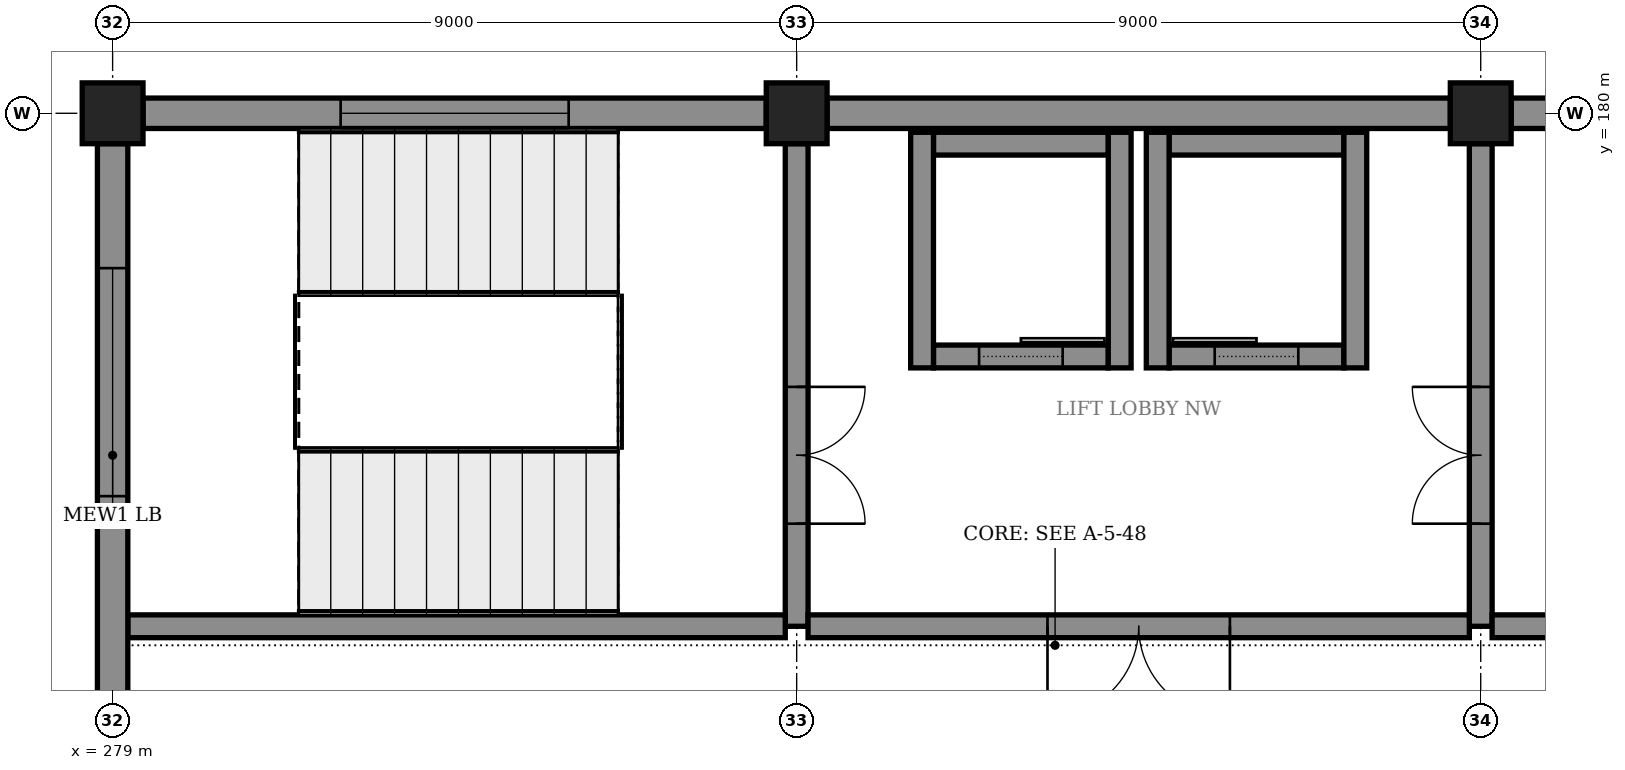
"""IFC4 building model, lengths in metres.
Left out: names, types, materials, properties, quantities, classifications, styles, units other than length and angle.
Written with IfcOpenShell. Run it as: python <this file> out.ifc"""

import sys

from ifc_helpers import new_model, si_unit, direction, frame, frame_2d, origin, origin_2d, place, context, subcontext, project, spatial, rectangle, extrude, element, fill, save


model = new_model("IFC4")
c1 = context("Model", 3, precision=1e-05, world=origin(), true_north=direction((0.0, 1.0)))
c2 = subcontext(c1, "Body", "Model", "MODEL_VIEW")
j1 = project(units=[si_unit("LENGTHUNIT", "METRE"), si_unit("PLANEANGLEUNIT", "RADIAN")], contexts=[c1])
p1 = place(None, origin())
s1 = spatial("IfcSite", under=j1, at=p1, CompositionType="ELEMENT")
p2 = place(p1, origin())
s2 = spatial("IfcBuilding", under=s1, at=p2, CompositionType="ELEMENT")
p3 = place(p2, frame((0.0, 0.0, 11.5)))
s3 = spatial("IfcBuildingStorey", under=s2, at=p3, CompositionType="ELEMENT", Elevation=11.5)
for number, where, z_axis, x_axis in (
    (1, (279.0, 180.0, 0.0), (0.0, 0.0, 1.0), (1.0, 0.0, 0.0)),
    (2, (288.0, 180.0, 0.0), (0.0, 0.0, 1.0), (1.0, 0.0, 0.0)),
    (3, (297.0, 180.0, 0.0), (0.0, 0.0, 1.0), (1.0, 0.0, 0.0)),
):
    element("IfcColumn", number, at=place(p3, frame(where, z_axis=z_axis, x_axis=x_axis)), inside=s3, PredefinedType="COLUMN", context=c2, shape_type="SweptSolid", body=[
        extrude(rectangle(XDim=0.8, YDim=0.8, at=origin_2d()), origin(), (0.0, 0.0, 1.0), 5.5),
    ])
p4 = place(p3, frame((279.4, 180.0, 0.0), z_axis=(0.0, 0.0, 1.0), x_axis=(1.0, 0.0, 0.0)))
e4 = element("IfcWall", 4, at=p4, inside=s3, PredefinedType="STANDARD", context=c2, shape_type="SweptSolid", body=[
    extrude(rectangle(XDim=8.2, YDim=0.4, at=frame_2d((4.1, 0.0))), origin(), (0.0, 0.0, 1.0), 4.32),
])
p5 = place(p4, frame((2.6, 0.0, 0.9)))
e5 = element("IfcOpeningElement", 5, at=p5, cuts=e4, PredefinedType="OPENING", context=c2, shape_type="SweptSolid", body=[
    extrude(rectangle(XDim=3.0, YDim=2.1, at=frame_2d((1.5, 1.05))), frame((0.0, 0.21, 0.0), z_axis=(0.0, -1.0, 0.0), x_axis=(1.0, 0.0, 0.0)), (0.0, 0.0, 1.0), 0.42),
])
p6 = place(p3, frame((288.4, 180.0, 0.0), z_axis=(0.0, 0.0, 1.0), x_axis=(1.0, 0.0, 0.0)))
e6 = element("IfcWall", 6, at=p6, inside=s3, PredefinedType="STANDARD", context=c2, shape_type="SweptSolid", body=[
    extrude(rectangle(XDim=8.2, YDim=0.4, at=frame_2d((4.1, 0.0))), origin(), (0.0, 0.0, 1.0), 4.32),
])
p7 = place(p3, frame((297.4, 180.0, 0.0), z_axis=(0.0, 0.0, 1.0), x_axis=(1.0, 0.0, 0.0)))
e7 = element("IfcWall", 7, at=p7, inside=s3, PredefinedType="STANDARD", context=c2, shape_type="SweptSolid", body=[
    extrude(rectangle(XDim=8.2, YDim=0.4, at=frame_2d((4.1, 0.0))), origin(), (0.0, 0.0, 1.0), 4.32),
])
p8 = place(p7, frame((2.6, 0.0, 0.9)))
e8 = element("IfcOpeningElement", 8, at=p8, cuts=e7, PredefinedType="OPENING", context=c2, shape_type="SweptSolid", body=[
    extrude(rectangle(XDim=3.0, YDim=2.1, at=frame_2d((1.5, 1.05))), frame((0.0, 0.21, 0.0), z_axis=(0.0, -1.0, 0.0), x_axis=(1.0, 0.0, 0.0)), (0.0, 0.0, 1.0), 0.42),
])
p9 = place(p3, frame((279.0, 171.4, 0.0), z_axis=(0.0, 0.0, 1.0), x_axis=(0.0, 1.0, 0.0)))
e9 = element("IfcWall", 9, at=p9, inside=s3, PredefinedType="STANDARD", context=c2, shape_type="SweptSolid", body=[
    extrude(rectangle(XDim=8.2, YDim=0.4, at=frame_2d((4.1, 0.0))), origin(), (0.0, 0.0, 1.0), 4.32),
])
p10 = place(p9, frame((3.562, 0.0, 0.9)))
e10 = element("IfcOpeningElement", 10, at=p10, cuts=e9, PredefinedType="OPENING", context=c2, shape_type="SweptSolid", body=[
    extrude(rectangle(XDim=3.0, YDim=2.1, at=frame_2d((1.5, 1.05))), frame((0.0, 0.21, 0.0), z_axis=(0.0, -1.0, 0.0), x_axis=(1.0, 0.0, 0.0)), (0.0, 0.0, 1.0), 0.42),
])
p11 = place(p3, frame((288.0, 173.25, 0.0), z_axis=(0.0, 0.0, 1.0), x_axis=(0.0, 1.0, 0.0)))
e11 = element("IfcWall", 11, at=p11, inside=s3, PredefinedType="SHEAR", context=c2, shape_type="SweptSolid", body=[
    extrude(rectangle(XDim=6.35, YDim=0.3, at=frame_2d((3.175, 0.0))), origin(), (0.0, 0.0, 1.0), 5.22),
])
p12 = place(p11, frame((1.35, 0.0, 0.0)))
e12 = element("IfcOpeningElement", 12, at=p12, cuts=e11, PredefinedType="OPENING", context=c2, shape_type="SweptSolid", body=[
    extrude(rectangle(XDim=1.8, YDim=2.4, at=frame_2d((0.9, 1.2))), frame((0.0, 0.16, 0.0), z_axis=(0.0, -1.0, 0.0), x_axis=(1.0, 0.0, 0.0)), (0.0, 0.0, 1.0), 0.32),
])
p13 = place(p3, frame((297.0, 173.25, 0.0), z_axis=(0.0, 0.0, 1.0), x_axis=(0.0, 1.0, 0.0)))
e13 = element("IfcWall", 13, at=p13, inside=s3, PredefinedType="SHEAR", context=c2, shape_type="SweptSolid", body=[
    extrude(rectangle(XDim=6.35, YDim=0.3, at=frame_2d((3.175, 0.0))), origin(), (0.0, 0.0, 1.0), 5.22),
])
p14 = place(p13, frame((1.35, 0.0, 0.0)))
e14 = element("IfcOpeningElement", 14, at=p14, cuts=e13, PredefinedType="OPENING", context=c2, shape_type="SweptSolid", body=[
    extrude(rectangle(XDim=1.8, YDim=2.4, at=frame_2d((0.9, 1.2))), frame((0.0, 0.16, 0.0), z_axis=(0.0, -1.0, 0.0), x_axis=(1.0, 0.0, 0.0)), (0.0, 0.0, 1.0), 0.32),
])
p15 = place(p3, frame((279.2, 173.25, 0.0), z_axis=(0.0, 0.0, 1.0), x_axis=(1.0, 0.0, 0.0)))
e15 = element("IfcWall", 15, at=p15, inside=s3, PredefinedType="SHEAR", context=c2, shape_type="SweptSolid", body=[
    extrude(rectangle(XDim=8.65, YDim=0.3, at=frame_2d((4.325, 0.0))), origin(), (0.0, 0.0, 1.0), 5.22),
])
p16 = place(p3, frame((288.15, 173.25, 0.0), z_axis=(0.0, 0.0, 1.0), x_axis=(1.0, 0.0, 0.0)))
e16 = element("IfcWall", 16, at=p16, inside=s3, PredefinedType="SHEAR", context=c2, shape_type="SweptSolid", body=[
    extrude(rectangle(XDim=8.7, YDim=0.3, at=frame_2d((4.35, 0.0))), origin(), (0.0, 0.0, 1.0), 5.22),
])
p17 = place(p16, frame((3.15, 0.0, 0.0)))
e17 = element("IfcOpeningElement", 17, at=p17, cuts=e16, PredefinedType="OPENING", context=c2, shape_type="SweptSolid", body=[
    extrude(rectangle(XDim=2.4, YDim=2.4, at=frame_2d((1.2, 1.2))), frame((0.0, 0.16, 0.0), z_axis=(0.0, -1.0, 0.0), x_axis=(1.0, 0.0, 0.0)), (0.0, 0.0, 1.0), 0.32),
])
p18 = place(p3, frame((297.15, 173.25, 0.0), z_axis=(0.0, 0.0, 1.0), x_axis=(1.0, 0.0, 0.0)))
e18 = element("IfcWall", 18, at=p18, inside=s3, PredefinedType="SHEAR", context=c2, shape_type="SweptSolid", body=[
    extrude(rectangle(XDim=8.7, YDim=0.3, at=frame_2d((4.35, 0.0))), origin(), (0.0, 0.0, 1.0), 5.22),
])
for number, where, z_axis, x_axis in (
    (19, (289.65, 176.65, 0.0), (0.0, 0.0, 1.0), (0.0, 1.0, 0.0)),
    (20, (292.25, 176.65, 0.0), (0.0, 0.0, 1.0), (0.0, 1.0, 0.0)),
):
    element("IfcWall", number, at=place(p3, frame(where, z_axis=z_axis, x_axis=x_axis)), inside=s3, PredefinedType="SHEAR", context=c2, shape_type="SweptSolid", body=[
        extrude(rectangle(XDim=3.1, YDim=0.3, at=frame_2d((1.55, 0.0))), origin(), (0.0, 0.0, 1.0), 5.5),
    ])
p19 = place(p3, frame((289.8, 179.6, 0.0), z_axis=(0.0, 0.0, 1.0), x_axis=(1.0, 0.0, 0.0)))
e21 = element("IfcWall", 21, at=p19, inside=s3, PredefinedType="SHEAR", context=c2, shape_type="SweptSolid", body=[
    extrude(rectangle(XDim=2.3, YDim=0.3, at=frame_2d((1.15, 0.0))), origin(), (0.0, 0.0, 1.0), 5.5),
])
p20 = place(p3, frame((289.8, 176.8, 0.0), z_axis=(0.0, 0.0, 1.0), x_axis=(1.0, 0.0, 0.0)))
e22 = element("IfcWall", 22, at=p20, inside=s3, PredefinedType="SHEAR", context=c2, shape_type="SweptSolid", body=[
    extrude(rectangle(XDim=2.3, YDim=0.3, at=frame_2d((1.15, 0.0))), origin(), (0.0, 0.0, 1.0), 5.5),
])
p21 = place(p20, frame((0.6, 0.0, 0.0)))
e23 = element("IfcOpeningElement", 23, at=p21, cuts=e22, PredefinedType="OPENING", context=c2, shape_type="SweptSolid", body=[
    extrude(rectangle(XDim=1.1, YDim=2.2, at=frame_2d((0.55, 1.1))), frame((0.0, 0.16, 0.0), z_axis=(0.0, -1.0, 0.0), x_axis=(1.0, 0.0, 0.0)), (0.0, 0.0, 1.0), 0.32),
])
for number, where, z_axis, x_axis in (
    (24, (292.75, 176.65, 0.0), (0.0, 0.0, 1.0), (0.0, 1.0, 0.0)),
    (25, (295.35, 176.65, 0.0), (0.0, 0.0, 1.0), (0.0, 1.0, 0.0)),
):
    element("IfcWall", number, at=place(p3, frame(where, z_axis=z_axis, x_axis=x_axis)), inside=s3, PredefinedType="SHEAR", context=c2, shape_type="SweptSolid", body=[
        extrude(rectangle(XDim=3.1, YDim=0.3, at=frame_2d((1.55, 0.0))), origin(), (0.0, 0.0, 1.0), 5.5),
    ])
p22 = place(p3, frame((292.9, 179.6, 0.0), z_axis=(0.0, 0.0, 1.0), x_axis=(1.0, 0.0, 0.0)))
e26 = element("IfcWall", 26, at=p22, inside=s3, PredefinedType="SHEAR", context=c2, shape_type="SweptSolid", body=[
    extrude(rectangle(XDim=2.3, YDim=0.3, at=frame_2d((1.15, 0.0))), origin(), (0.0, 0.0, 1.0), 5.5),
])
p23 = place(p3, frame((292.9, 176.8, 0.0), z_axis=(0.0, 0.0, 1.0), x_axis=(1.0, 0.0, 0.0)))
e27 = element("IfcWall", 27, at=p23, inside=s3, PredefinedType="SHEAR", context=c2, shape_type="SweptSolid", body=[
    extrude(rectangle(XDim=2.3, YDim=0.3, at=frame_2d((1.15, 0.0))), origin(), (0.0, 0.0, 1.0), 5.5),
])
p24 = place(p23, frame((0.6, 0.0, 0.0)))
e28 = element("IfcOpeningElement", 28, at=p24, cuts=e27, PredefinedType="OPENING", context=c2, shape_type="SweptSolid", body=[
    extrude(rectangle(XDim=1.1, YDim=2.2, at=frame_2d((0.55, 1.1))), frame((0.0, 0.16, 0.0), z_axis=(0.0, -1.0, 0.0), x_axis=(1.0, 0.0, 0.0)), (0.0, 0.0, 1.0), 0.32),
])
p25 = place(p5, origin())
e29 = element("IfcWindow", 29, at=p25, inside=s3, PartitioningType="TRIPLE_PANEL_VERTICAL", PredefinedType="WINDOW", context=c2, shape_type="SweptSolid", body=[
    extrude(rectangle(XDim=3.0, YDim=2.1, at=frame_2d((1.5, 1.05))), frame((0.0, 0.03, 0.0), z_axis=(0.0, -1.0, 0.0), x_axis=(1.0, 0.0, 0.0)), (0.0, 0.0, 1.0), 0.06),
])
fill(e5, e29)
p26 = place(p10, origin())
e30 = element("IfcWindow", 30, at=p26, inside=s3, PartitioningType="TRIPLE_PANEL_VERTICAL", PredefinedType="WINDOW", context=c2, shape_type="SweptSolid", body=[
    extrude(rectangle(XDim=3.0, YDim=2.1, at=frame_2d((1.5, 1.05))), frame((0.0, 0.03, 0.0), z_axis=(0.0, -1.0, 0.0), x_axis=(1.0, 0.0, 0.0)), (0.0, 0.0, 1.0), 0.06),
])
fill(e10, e30)
p27 = place(p12, frame((1.8, 0.0, 0.0), z_axis=(0.0, 0.0, 1.0), x_axis=(-1.0, 0.0, 0.0)))
e31 = element("IfcDoor", 31, at=p27, inside=s3, OperationType="DOUBLE_DOOR_SINGLE_SWING", PredefinedType="DOOR", context=c2, shape_type="SweptSolid", body=[
    extrude(rectangle(XDim=1.8, YDim=2.4, at=frame_2d((0.9, 1.2))), frame((0.0, 0.025, 0.0), z_axis=(0.0, -1.0, 0.0), x_axis=(1.0, 0.0, 0.0)), (0.0, 0.0, 1.0), 0.05),
])
fill(e12, e31)
p28 = place(p14, origin())
e32 = element("IfcDoor", 32, at=p28, inside=s3, OperationType="DOUBLE_DOOR_SINGLE_SWING", PredefinedType="DOOR", context=c2, shape_type="SweptSolid", body=[
    extrude(rectangle(XDim=1.8, YDim=2.4, at=frame_2d((0.9, 1.2))), frame((0.0, 0.025, 0.0), z_axis=(0.0, -1.0, 0.0), x_axis=(1.0, 0.0, 0.0)), (0.0, 0.0, 1.0), 0.05),
])
fill(e14, e32)
p29 = place(p17, frame((2.4, 0.0, 0.0), z_axis=(0.0, 0.0, 1.0), x_axis=(-1.0, 0.0, 0.0)))
e33 = element("IfcDoor", 33, at=p29, inside=s3, OperationType="DOUBLE_DOOR_SINGLE_SWING", PredefinedType="DOOR", context=c2, shape_type="SweptSolid", body=[
    extrude(rectangle(XDim=2.4, YDim=2.4, at=frame_2d((1.2, 1.2))), frame((0.0, 0.025, 0.0), z_axis=(0.0, -1.0, 0.0), x_axis=(1.0, 0.0, 0.0)), (0.0, 0.0, 1.0), 0.05),
])
fill(e17, e33)
p30 = place(p21, origin())
e34 = element("IfcDoor", 34, at=p30, inside=s3, OperationType="SLIDING_TO_RIGHT", PredefinedType="DOOR", context=c2, shape_type="SweptSolid", body=[
    extrude(rectangle(XDim=1.1, YDim=2.2, at=frame_2d((0.55, 1.1))), frame((0.0, 0.025, 0.0), z_axis=(0.0, -1.0, 0.0), x_axis=(1.0, 0.0, 0.0)), (0.0, 0.0, 1.0), 0.05),
])
fill(e23, e34)
p31 = place(p24, origin())
e35 = element("IfcDoor", 35, at=p31, inside=s3, OperationType="SLIDING_TO_LEFT", PredefinedType="DOOR", context=c2, shape_type="SweptSolid", body=[
    extrude(rectangle(XDim=1.1, YDim=2.2, at=frame_2d((0.55, 1.1))), frame((0.0, 0.025, 0.0), z_axis=(0.0, -1.0, 0.0), x_axis=(1.0, 0.0, 0.0)), (0.0, 0.0, 1.0), 0.05),
])
fill(e28, e35)
save(model, sys.argv[1])
